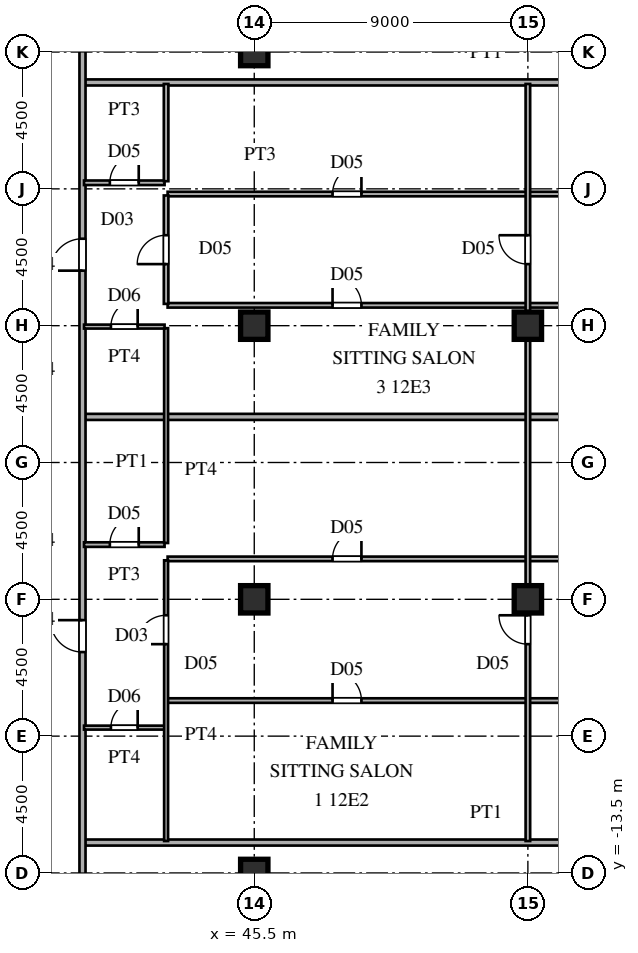
"""IFC4 building model, lengths in metres.
Left out: names, types, materials, properties, quantities, classifications, styles, units other than length and angle.
Written with IfcOpenShell. Run it as: python <this file> out.ifc"""

import sys

from ifc_helpers import new_model, si_unit, direction, frame, frame_2d, origin, origin_2d, place, context, subcontext, project, spatial, rectangle, i_section, extrude, source, transform, mapped, element, fill, save


model = new_model("IFC4")
c1 = context("Model", 3, precision=1e-05, world=origin(), true_north=direction((0.0, 1.0)))
c2 = subcontext(c1, "Body", "Model", "MODEL_VIEW")
j1 = project(units=[si_unit("LENGTHUNIT", "METRE"), si_unit("PLANEANGLEUNIT", "RADIAN")], contexts=[c1])
p1 = place(None, origin())
s1 = spatial("IfcSite", under=j1, at=p1, CompositionType="ELEMENT")
p2 = place(p1, origin())
s2 = spatial("IfcBuilding", under=s1, at=p2, CompositionType="ELEMENT")
p3 = place(p2, frame((0.0, 0.0, 47.7)))
s3 = spatial("IfcBuildingStorey", under=s2, at=p3, CompositionType="ELEMENT", Elevation=47.7)
m1 = source(origin(), c2, "Body", "SweptSolid", [
    extrude(i_section(OverallWidth=0.9, OverallDepth=0.9, WebThickness=0.036, FlangeThickness=0.055, at=origin_2d()), origin(), (0.0, 0.0, 1.0), 3.6),
])
for number, where, z_axis, x_axis in (
    (1, (45.5, -13.5, 0.0), (0.0, 0.0, 1.0), (1.0, 0.0, 0.0)),
    (2, (45.5, -4.5, 0.0), (0.0, 0.0, 1.0), (1.0, 0.0, 0.0)),
    (3, (45.5, 4.5, 0.0), (0.0, 0.0, 1.0), (1.0, 0.0, 0.0)),
    (4, (45.5, 13.5, 0.0), (0.0, 0.0, 1.0), (1.0, 0.0, 0.0)),
    (5, (54.5, -4.5, 0.0), (0.0, 0.0, 1.0), (1.0, 0.0, 0.0)),
    (6, (54.5, 4.5, 0.0), (0.0, 0.0, 1.0), (1.0, 0.0, 0.0)),
):
    element("IfcColumn", number, at=place(p3, frame(where, z_axis=z_axis, x_axis=x_axis)), inside=s3, PredefinedType="COLUMN", context=c2, shape_type="MappedRepresentation", body=[
        mapped(m1, transform((0.0, 0.0, 0.0), scale=1.0)),
    ])
p4 = place(p3, frame((39.93, -12.5, 0.0), z_axis=(0.0, 0.0, 1.0), x_axis=(1.0, 0.0, 0.0)))
e7 = element("IfcWall", 7, at=p4, inside=s3, PredefinedType="PARTITIONING", context=c2, shape_type="SweptSolid", body=[
    extrude(rectangle(XDim=26.407, YDim=0.2, at=frame_2d((13.204, 0.0))), origin(), (0.0, 0.0, 1.0), 3.38),
])
p5 = place(p3, frame((39.9, -8.72, 0.0), z_axis=(0.0, 0.0, 1.0), x_axis=(1.0, 0.0, 0.0)))
e8 = element("IfcWall", 8, at=p5, inside=s3, PredefinedType="PARTITIONING", context=c2, shape_type="SweptSolid", body=[
    extrude(rectangle(XDim=2.65, YDim=0.13, at=frame_2d((1.325, 0.0))), origin(), (0.0, 0.0, 1.0), 3.38),
])
p6 = place(p5, frame((0.885, 0.0, 0.0)))
e9 = element("IfcOpeningElement", 9, at=p6, cuts=e8, PredefinedType="OPENING", context=c2, shape_type="SweptSolid", body=[
    extrude(rectangle(XDim=0.88, YDim=2.1, at=frame_2d((0.44, 1.05))), frame((0.0, 0.075, 0.0), z_axis=(0.0, -1.0, 0.0), x_axis=(1.0, 0.0, 0.0)), (0.0, 0.0, 1.0), 0.15),
])
p7 = place(p3, frame((42.65, -7.83, 0.0), z_axis=(0.0, 0.0, 1.0), x_axis=(1.0, 0.0, 0.0)))
e10 = element("IfcWall", 10, at=p7, inside=s3, PredefinedType="PARTITIONING", context=c2, shape_type="SweptSolid", body=[
    extrude(rectangle(XDim=29.885, YDim=0.15, at=frame_2d((14.942, 0.0))), origin(), (0.0, 0.0, 1.0), 3.38),
])
p8 = place(p7, frame((5.425, 0.0, 0.0)))
e11 = element("IfcOpeningElement", 11, at=p8, cuts=e10, PredefinedType="OPENING", context=c2, shape_type="SweptSolid", body=[
    extrude(rectangle(XDim=0.95, YDim=2.15, at=frame_2d((0.475, 1.075))), frame((0.0, 0.085, 0.0), z_axis=(0.0, -1.0, 0.0), x_axis=(1.0, 0.0, 0.0)), (0.0, 0.0, 1.0), 0.17),
])
p9 = place(p7, frame((14.225, 0.0, 0.0)))
e12 = element("IfcOpeningElement", 12, at=p9, cuts=e10, PredefinedType="OPENING", context=c2, shape_type="SweptSolid", body=[
    extrude(rectangle(XDim=0.95, YDim=2.15, at=frame_2d((0.475, 1.075))), frame((0.0, 0.085, 0.0), z_axis=(0.0, -1.0, 0.0), x_axis=(1.0, 0.0, 0.0)), (0.0, 0.0, 1.0), 0.17),
])
p10 = place(p3, frame((42.65, -3.17, 0.0), z_axis=(0.0, 0.0, 1.0), x_axis=(1.0, 0.0, 0.0)))
e13 = element("IfcWall", 13, at=p10, inside=s3, PredefinedType="PARTITIONING", context=c2, shape_type="SweptSolid", body=[
    extrude(rectangle(XDim=29.885, YDim=0.15, at=frame_2d((14.942, 0.0))), origin(), (0.0, 0.0, 1.0), 3.38),
])
p11 = place(p10, frame((5.425, 0.0, 0.0)))
e14 = element("IfcOpeningElement", 14, at=p11, cuts=e13, PredefinedType="OPENING", context=c2, shape_type="SweptSolid", body=[
    extrude(rectangle(XDim=0.95, YDim=2.15, at=frame_2d((0.475, 1.075))), frame((0.0, 0.085, 0.0), z_axis=(0.0, -1.0, 0.0), x_axis=(1.0, 0.0, 0.0)), (0.0, 0.0, 1.0), 0.17),
])
p12 = place(p10, frame((14.225, 0.0, 0.0)))
e15 = element("IfcOpeningElement", 15, at=p12, cuts=e13, PredefinedType="OPENING", context=c2, shape_type="SweptSolid", body=[
    extrude(rectangle(XDim=0.95, YDim=2.15, at=frame_2d((0.475, 1.075))), frame((0.0, 0.085, 0.0), z_axis=(0.0, -1.0, 0.0), x_axis=(1.0, 0.0, 0.0)), (0.0, 0.0, 1.0), 0.17),
])
p13 = place(p3, frame((39.9, -2.7, 0.0), z_axis=(0.0, 0.0, 1.0), x_axis=(1.0, 0.0, 0.0)))
e16 = element("IfcWall", 16, at=p13, inside=s3, PredefinedType="PARTITIONING", context=c2, shape_type="SweptSolid", body=[
    extrude(rectangle(XDim=2.65, YDim=0.15, at=frame_2d((1.325, 0.0))), origin(), (0.0, 0.0, 1.0), 3.38),
])
p14 = place(p13, frame((0.85, 0.0, 0.0)))
e17 = element("IfcOpeningElement", 17, at=p14, cuts=e16, PredefinedType="OPENING", context=c2, shape_type="SweptSolid", body=[
    extrude(rectangle(XDim=0.95, YDim=2.15, at=frame_2d((0.475, 1.075))), frame((0.0, 0.085, 0.0), z_axis=(0.0, -1.0, 0.0), x_axis=(1.0, 0.0, 0.0)), (0.0, 0.0, 1.0), 0.17),
])
p15 = place(p3, frame((39.93, 1.5, 0.0), z_axis=(0.0, 0.0, 1.0), x_axis=(1.0, 0.0, 0.0)))
e18 = element("IfcWall", 18, at=p15, inside=s3, PredefinedType="PARTITIONING", context=c2, shape_type="SweptSolid", body=[
    extrude(rectangle(XDim=32.575, YDim=0.2, at=frame_2d((16.288, 0.0))), origin(), (0.0, 0.0, 1.0), 3.38),
])
p16 = place(p3, frame((39.9, 4.47, 0.0), z_axis=(0.0, 0.0, 1.0), x_axis=(1.0, 0.0, 0.0)))
e19 = element("IfcWall", 19, at=p16, inside=s3, PredefinedType="PARTITIONING", context=c2, shape_type="SweptSolid", body=[
    extrude(rectangle(XDim=2.65, YDim=0.13, at=frame_2d((1.325, 0.0))), origin(), (0.0, 0.0, 1.0), 2.68),
])
p17 = place(p16, frame((0.885, 0.0, 0.0)))
e20 = element("IfcOpeningElement", 20, at=p17, cuts=e19, PredefinedType="OPENING", context=c2, shape_type="SweptSolid", body=[
    extrude(rectangle(XDim=0.88, YDim=2.1, at=frame_2d((0.44, 1.05))), frame((0.0, 0.075, 0.0), z_axis=(0.0, -1.0, 0.0), x_axis=(1.0, 0.0, 0.0)), (0.0, 0.0, 1.0), 0.15),
])
p18 = place(p3, frame((42.65, 5.17, 0.0), z_axis=(0.0, 0.0, 1.0), x_axis=(1.0, 0.0, 0.0)))
e21 = element("IfcWall", 21, at=p18, inside=s3, PredefinedType="PARTITIONING", context=c2, shape_type="SweptSolid", body=[
    extrude(rectangle(XDim=29.885, YDim=0.15, at=frame_2d((14.942, 0.0))), origin(), (0.0, 0.0, 1.0), 3.38),
])
p19 = place(p18, frame((5.425, 0.0, 0.0)))
e22 = element("IfcOpeningElement", 22, at=p19, cuts=e21, PredefinedType="OPENING", context=c2, shape_type="SweptSolid", body=[
    extrude(rectangle(XDim=0.95, YDim=2.15, at=frame_2d((0.475, 1.075))), frame((0.0, 0.085, 0.0), z_axis=(0.0, -1.0, 0.0), x_axis=(1.0, 0.0, 0.0)), (0.0, 0.0, 1.0), 0.17),
])
p20 = place(p18, frame((14.225, 0.0, 0.0)))
e23 = element("IfcOpeningElement", 23, at=p20, cuts=e21, PredefinedType="OPENING", context=c2, shape_type="SweptSolid", body=[
    extrude(rectangle(XDim=0.95, YDim=2.15, at=frame_2d((0.475, 1.075))), frame((0.0, 0.085, 0.0), z_axis=(0.0, -1.0, 0.0), x_axis=(1.0, 0.0, 0.0)), (0.0, 0.0, 1.0), 0.17),
])
p21 = place(p3, frame((42.65, 8.83, 0.0), z_axis=(0.0, 0.0, 1.0), x_axis=(1.0, 0.0, 0.0)))
e24 = element("IfcWall", 24, at=p21, inside=s3, PredefinedType="PARTITIONING", context=c2, shape_type="SweptSolid", body=[
    extrude(rectangle(XDim=29.885, YDim=0.15, at=frame_2d((14.942, 0.0))), origin(), (0.0, 0.0, 1.0), 3.38),
])
p22 = place(p21, frame((5.425, 0.0, 0.0)))
e25 = element("IfcOpeningElement", 25, at=p22, cuts=e24, PredefinedType="OPENING", context=c2, shape_type="SweptSolid", body=[
    extrude(rectangle(XDim=0.95, YDim=2.15, at=frame_2d((0.475, 1.075))), frame((0.0, 0.085, 0.0), z_axis=(0.0, -1.0, 0.0), x_axis=(1.0, 0.0, 0.0)), (0.0, 0.0, 1.0), 0.17),
])
p23 = place(p21, frame((23.225, 0.0, 0.0)))
e26 = element("IfcOpeningElement", 26, at=p23, cuts=e24, PredefinedType="OPENING", context=c2, shape_type="SweptSolid", body=[
    extrude(rectangle(XDim=0.95, YDim=2.15, at=frame_2d((0.475, 1.075))), frame((0.0, 0.085, 0.0), z_axis=(0.0, -1.0, 0.0), x_axis=(1.0, 0.0, 0.0)), (0.0, 0.0, 1.0), 0.17),
])
p24 = place(p21, frame((14.225, 0.0, 0.0)))
e27 = element("IfcOpeningElement", 27, at=p24, cuts=e24, PredefinedType="OPENING", context=c2, shape_type="SweptSolid", body=[
    extrude(rectangle(XDim=0.95, YDim=2.15, at=frame_2d((0.475, 1.075))), frame((0.0, 0.085, 0.0), z_axis=(0.0, -1.0, 0.0), x_axis=(1.0, 0.0, 0.0)), (0.0, 0.0, 1.0), 0.17),
])
p25 = place(p3, frame((39.9, 9.2, 0.0), z_axis=(0.0, 0.0, 1.0), x_axis=(1.0, 0.0, 0.0)))
e28 = element("IfcWall", 28, at=p25, inside=s3, PredefinedType="PARTITIONING", context=c2, shape_type="SweptSolid", body=[
    extrude(rectangle(XDim=2.65, YDim=0.15, at=frame_2d((1.325, 0.0))), origin(), (0.0, 0.0, 1.0), 3.38),
])
p26 = place(p25, frame((0.85, 0.0, 0.0)))
e29 = element("IfcOpeningElement", 29, at=p26, cuts=e28, PredefinedType="OPENING", context=c2, shape_type="SweptSolid", body=[
    extrude(rectangle(XDim=0.95, YDim=2.15, at=frame_2d((0.475, 1.075))), frame((0.0, 0.085, 0.0), z_axis=(0.0, -1.0, 0.0), x_axis=(1.0, 0.0, 0.0)), (0.0, 0.0, 1.0), 0.17),
])
p27 = place(p3, frame((39.93, 12.5, 0.0), z_axis=(0.0, 0.0, 1.0), x_axis=(1.0, 0.0, 0.0)))
e30 = element("IfcWall", 30, at=p27, inside=s3, PredefinedType="PARTITIONING", context=c2, shape_type="SweptSolid", body=[
    extrude(rectangle(XDim=26.407, YDim=0.2, at=frame_2d((13.204, 0.0))), origin(), (0.0, 0.0, 1.0), 3.38),
])
p28 = place(p3, frame((39.85, -15.515, 0.0), z_axis=(0.0, 0.0, 1.0), x_axis=(0.0, 1.0, 0.0)))
e31 = element("IfcWall", 31, at=p28, inside=s3, PredefinedType="PARTITIONING", context=c2, shape_type="SweptSolid", body=[
    extrude(rectangle(XDim=31.03, YDim=0.2, at=frame_2d((15.515, 0.0))), origin(), (0.0, 0.0, 1.0), 3.38),
])
p29 = place(p28, frame((0.94, 0.0, 0.0)))
e32 = element("IfcOpeningElement", 32, at=p29, cuts=e31, PredefinedType="OPENING", context=c2, shape_type="SweptSolid", body=[
    extrude(rectangle(XDim=1.05, YDim=2.25, at=frame_2d((0.525, 1.125))), frame((0.0, 0.11, 0.0), z_axis=(0.0, -1.0, 0.0), x_axis=(1.0, 0.0, 0.0)), (0.0, 0.0, 1.0), 0.22),
])
p30 = place(p28, frame((9.28, 0.0, 0.0)))
e33 = element("IfcOpeningElement", 33, at=p30, cuts=e31, PredefinedType="OPENING", context=c2, shape_type="SweptSolid", body=[
    extrude(rectangle(XDim=1.05, YDim=2.25, at=frame_2d((0.525, 1.125))), frame((0.0, 0.11, 0.0), z_axis=(0.0, -1.0, 0.0), x_axis=(1.0, 0.0, 0.0)), (0.0, 0.0, 1.0), 0.22),
])
p31 = place(p28, frame((21.825, 0.0, 0.0)))
e34 = element("IfcOpeningElement", 34, at=p31, cuts=e31, PredefinedType="OPENING", context=c2, shape_type="SweptSolid", body=[
    extrude(rectangle(XDim=1.05, YDim=2.25, at=frame_2d((0.525, 1.125))), frame((0.0, 0.11, 0.0), z_axis=(0.0, -1.0, 0.0), x_axis=(1.0, 0.0, 0.0)), (0.0, 0.0, 1.0), 0.22),
])
p32 = place(p28, frame((29.04, 0.0, 0.0)))
e35 = element("IfcOpeningElement", 35, at=p32, cuts=e31, PredefinedType="OPENING", context=c2, shape_type="SweptSolid", body=[
    extrude(rectangle(XDim=1.05, YDim=2.25, at=frame_2d((0.525, 1.125))), frame((0.0, 0.11, 0.0), z_axis=(0.0, -1.0, 0.0), x_axis=(1.0, 0.0, 0.0)), (0.0, 0.0, 1.0), 0.22),
])
p33 = place(p3, frame((42.6, -12.45, 0.0), z_axis=(0.0, 0.0, 1.0), x_axis=(0.0, 1.0, 0.0)))
e36 = element("IfcWall", 36, at=p33, inside=s3, PredefinedType="PARTITIONING", context=c2, shape_type="SweptSolid", body=[
    extrude(rectangle(XDim=9.233, YDim=0.13, at=frame_2d((4.616, 0.0))), origin(), (0.0, 0.0, 1.0), 3.38),
])
p34 = place(p33, frame((6.475, 0.0, 0.0)))
e37 = element("IfcOpeningElement", 37, at=p34, cuts=e36, PredefinedType="OPENING", context=c2, shape_type="SweptSolid", body=[
    extrude(rectangle(XDim=0.95, YDim=2.15, at=frame_2d((0.475, 1.075))), frame((0.0, 0.075, 0.0), z_axis=(0.0, -1.0, 0.0), x_axis=(1.0, 0.0, 0.0)), (0.0, 0.0, 1.0), 0.15),
])
p35 = place(p3, frame((42.6, -2.648, 0.0), z_axis=(0.0, 0.0, 1.0), x_axis=(0.0, 1.0, 0.0)))
e38 = element("IfcWall", 38, at=p35, inside=s3, PredefinedType="PARTITIONING", context=c2, shape_type="SweptSolid", body=[
    extrude(rectangle(XDim=7.066, YDim=0.13, at=frame_2d((3.533, 0.0))), origin(), (0.0, 0.0, 1.0), 3.38),
])
p36 = place(p3, frame((42.6, 5.217, 0.0), z_axis=(0.0, 0.0, 1.0), x_axis=(0.0, 1.0, 0.0)))
e39 = element("IfcWall", 39, at=p36, inside=s3, PredefinedType="PARTITIONING", context=c2, shape_type="SweptSolid", body=[
    extrude(rectangle(XDim=3.566, YDim=0.15, at=frame_2d((1.783, 0.0))), origin(), (0.0, 0.0, 1.0), 3.38),
])
p37 = place(p36, frame((1.308, 0.0, 0.0)))
e40 = element("IfcOpeningElement", 40, at=p37, cuts=e39, PredefinedType="OPENING", context=c2, shape_type="SweptSolid", body=[
    extrude(rectangle(XDim=0.95, YDim=2.15, at=frame_2d((0.475, 1.075))), frame((0.0, 0.085, 0.0), z_axis=(0.0, -1.0, 0.0), x_axis=(1.0, 0.0, 0.0)), (0.0, 0.0, 1.0), 0.17),
])
p38 = place(p3, frame((42.6, 9.252, 0.0), z_axis=(0.0, 0.0, 1.0), x_axis=(0.0, 1.0, 0.0)))
e41 = element("IfcWall", 41, at=p38, inside=s3, PredefinedType="PARTITIONING", context=c2, shape_type="SweptSolid", body=[
    extrude(rectangle(XDim=3.198, YDim=0.15, at=frame_2d((1.599, 0.0))), origin(), (0.0, 0.0, 1.0), 3.38),
])
p39 = place(p3, frame((54.5, -12.45, 0.0), z_axis=(0.0, 0.0, 1.0), x_axis=(0.0, 1.0, 0.0)))
e42 = element("IfcWall", 42, at=p39, inside=s3, PredefinedType="PARTITIONING", context=c2, shape_type="SweptSolid", body=[
    extrude(rectangle(XDim=24.9, YDim=0.15, at=frame_2d((12.45, 0.0))), origin(), (0.0, 0.0, 1.0), 2.68),
])
p40 = place(p39, frame((6.475, 0.0, 0.0)))
e43 = element("IfcOpeningElement", 43, at=p40, cuts=e42, PredefinedType="OPENING", context=c2, shape_type="SweptSolid", body=[
    extrude(rectangle(XDim=0.95, YDim=2.15, at=frame_2d((0.475, 1.075))), frame((0.0, 0.085, 0.0), z_axis=(0.0, -1.0, 0.0), x_axis=(1.0, 0.0, 0.0)), (0.0, 0.0, 1.0), 0.17),
])
p41 = place(p39, frame((18.975, 0.0, 0.0)))
e44 = element("IfcOpeningElement", 44, at=p41, cuts=e42, PredefinedType="OPENING", context=c2, shape_type="SweptSolid", body=[
    extrude(rectangle(XDim=0.95, YDim=2.15, at=frame_2d((0.475, 1.075))), frame((0.0, 0.085, 0.0), z_axis=(0.0, -1.0, 0.0), x_axis=(1.0, 0.0, 0.0)), (0.0, 0.0, 1.0), 0.17),
])
m2 = source(origin(), c2, "Body", "SweptSolid", [
    extrude(rectangle(XDim=0.88, YDim=2.1, at=frame_2d((0.44, 1.05))), frame((0.0, 0.025, 0.0), z_axis=(0.0, -1.0, 0.0), x_axis=(1.0, 0.0, 0.0)), (0.0, 0.0, 1.0), 0.05),
])
p42 = place(p6, origin())
e45 = element("IfcDoor", 45, at=p42, inside=s3, OperationType="SINGLE_SWING_RIGHT", PredefinedType="DOOR", context=c2, shape_type="MappedRepresentation", body=[
    mapped(m2, transform((0.0, 0.0, 0.0), scale=1.0)),
])
fill(e9, e45)
m3 = source(origin(), c2, "Body", "SweptSolid", [
    extrude(rectangle(XDim=0.95, YDim=2.15, at=frame_2d((0.475, 1.075))), frame((0.0, 0.025, 0.0), z_axis=(0.0, -1.0, 0.0), x_axis=(1.0, 0.0, 0.0)), (0.0, 0.0, 1.0), 0.05),
])
p43 = place(p8, origin())
e46 = element("IfcDoor", 46, at=p43, inside=s3, OperationType="SINGLE_SWING_LEFT", PredefinedType="DOOR", context=c2, shape_type="MappedRepresentation", body=[
    mapped(m3, transform((0.0, 0.0, 0.0), scale=1.0)),
])
fill(e11, e46)
p44 = place(p11, origin())
e47 = element("IfcDoor", 47, at=p44, inside=s3, OperationType="SINGLE_SWING_RIGHT", PredefinedType="DOOR", context=c2, shape_type="MappedRepresentation", body=[
    mapped(m3, transform((0.0, 0.0, 0.0), scale=1.0)),
])
fill(e14, e47)
p45 = place(p14, origin())
e48 = element("IfcDoor", 48, at=p45, inside=s3, OperationType="SINGLE_SWING_RIGHT", PredefinedType="DOOR", context=c2, shape_type="MappedRepresentation", body=[
    mapped(m3, transform((0.0, 0.0, 0.0), scale=1.0)),
])
fill(e17, e48)
p46 = place(p17, origin())
e49 = element("IfcDoor", 49, at=p46, inside=s3, OperationType="SINGLE_SWING_RIGHT", PredefinedType="DOOR", context=c2, shape_type="MappedRepresentation", body=[
    mapped(m2, transform((0.0, 0.0, 0.0), scale=1.0)),
])
fill(e20, e49)
p47 = place(p19, origin())
e50 = element("IfcDoor", 50, at=p47, inside=s3, OperationType="SINGLE_SWING_LEFT", PredefinedType="DOOR", context=c2, shape_type="MappedRepresentation", body=[
    mapped(m3, transform((0.0, 0.0, 0.0), scale=1.0)),
])
fill(e22, e50)
p48 = place(p22, origin())
e51 = element("IfcDoor", 51, at=p48, inside=s3, OperationType="SINGLE_SWING_RIGHT", PredefinedType="DOOR", context=c2, shape_type="MappedRepresentation", body=[
    mapped(m3, transform((0.0, 0.0, 0.0), scale=1.0)),
])
fill(e25, e51)
p49 = place(p26, origin())
e52 = element("IfcDoor", 52, at=p49, inside=s3, OperationType="SINGLE_SWING_RIGHT", PredefinedType="DOOR", context=c2, shape_type="MappedRepresentation", body=[
    mapped(m3, transform((0.0, 0.0, 0.0), scale=1.0)),
])
fill(e29, e52)
m4 = source(origin(), c2, "Body", "SweptSolid", [
    extrude(rectangle(XDim=1.05, YDim=2.25, at=frame_2d((0.525, 1.125))), frame((0.0, 0.025, 0.0), z_axis=(0.0, -1.0, 0.0), x_axis=(1.0, 0.0, 0.0)), (0.0, 0.0, 1.0), 0.05),
])
p50 = place(p30, origin())
e53 = element("IfcDoor", 53, at=p50, inside=s3, OperationType="SINGLE_SWING_RIGHT", PredefinedType="DOOR", context=c2, shape_type="MappedRepresentation", body=[
    mapped(m4, transform((0.0, 0.0, 0.0), scale=1.0)),
])
fill(e33, e53)
p51 = place(p31, origin())
e54 = element("IfcDoor", 54, at=p51, inside=s3, OperationType="SINGLE_SWING_LEFT", PredefinedType="DOOR", context=c2, shape_type="MappedRepresentation", body=[
    mapped(m4, transform((0.0, 0.0, 0.0), scale=1.0)),
])
fill(e34, e54)
p52 = place(p34, origin())
e55 = element("IfcDoor", 55, at=p52, inside=s3, OperationType="SINGLE_SWING_LEFT", PredefinedType="DOOR", context=c2, shape_type="MappedRepresentation", body=[
    mapped(m3, transform((0.0, 0.0, 0.0), scale=1.0)),
])
fill(e37, e55)
p53 = place(p37, origin())
e56 = element("IfcDoor", 56, at=p53, inside=s3, OperationType="SINGLE_SWING_LEFT", PredefinedType="DOOR", context=c2, shape_type="MappedRepresentation", body=[
    mapped(m3, transform((0.0, 0.0, 0.0), scale=1.0)),
])
fill(e40, e56)
p54 = place(p40, origin())
e57 = element("IfcDoor", 57, at=p54, inside=s3, OperationType="SINGLE_SWING_RIGHT", PredefinedType="DOOR", context=c2, shape_type="MappedRepresentation", body=[
    mapped(m3, transform((0.0, 0.0, 0.0), scale=1.0)),
])
fill(e43, e57)
p55 = place(p41, origin())
e58 = element("IfcDoor", 58, at=p55, inside=s3, OperationType="SINGLE_SWING_RIGHT", PredefinedType="DOOR", context=c2, shape_type="MappedRepresentation", body=[
    mapped(m3, transform((0.0, 0.0, 0.0), scale=1.0)),
])
fill(e44, e58)
save(model, sys.argv[1])
